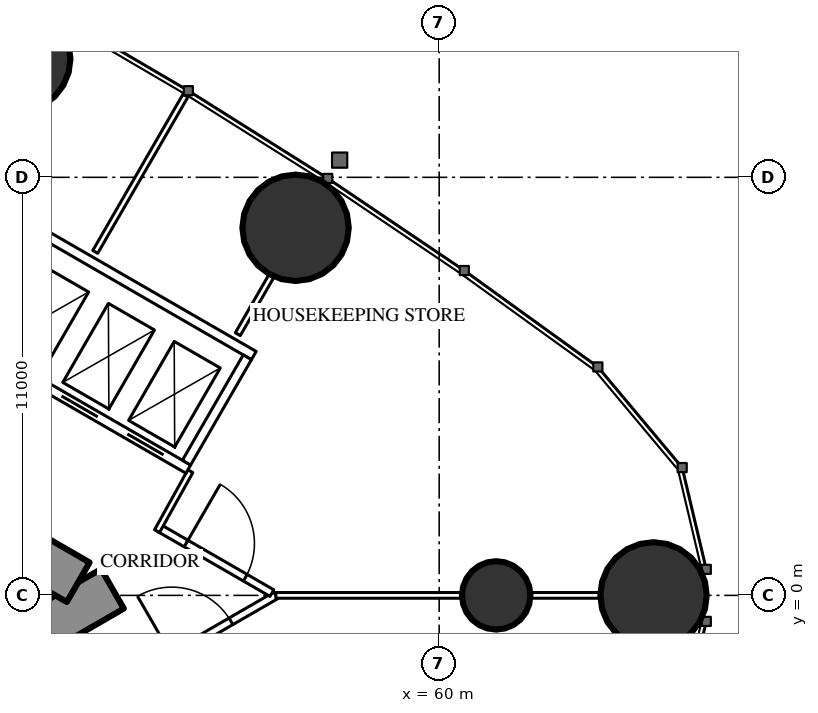
"""IFC4 building model, lengths in metres.
Left out: names, types, materials, properties, quantities, classifications, styles, units other than length and angle.
Written with IfcOpenShell. Run it as: python <this file> out.ifc"""

import sys

from ifc_helpers import new_model, si_unit, direction, frame, frame_2d, origin, origin_2d, place, context, subcontext, project, spatial, rectangle, circle, extrude, element, fill, save


model = new_model("IFC4")
c1 = context("Model", 3, precision=1e-05, world=origin(), true_north=direction((0.0, 1.0)))
c2 = subcontext(c1, "Body", "Model", "MODEL_VIEW")
j1 = project(units=[si_unit("LENGTHUNIT", "METRE"), si_unit("PLANEANGLEUNIT", "RADIAN")], contexts=[c1])
p1 = place(None, origin())
s1 = spatial("IfcSite", under=j1, at=p1, CompositionType="ELEMENT")
p2 = place(p1, origin())
s2 = spatial("IfcBuilding", under=s1, at=p2, CompositionType="ELEMENT")
p3 = place(p2, frame((0.0, 0.0, 191.3)))
s3 = spatial("IfcBuildingStorey", under=s2, at=p3, CompositionType="ELEMENT", Elevation=191.3)
for number, where, z_axis, x_axis in (
    (1, (65.64, 0.0, 0.0), (0.0, 0.0, 1.0), (1.0, 0.0, 0.0)),
    (2, (56.221, 9.672, 0.0), (0.0, 0.0, 1.0), (1.0, 0.0, 0.0)),
    (3, (48.897, 14.121, 0.0), (0.0, 0.0, 1.0), (1.0, 0.0, 0.0)),
):
    element("IfcColumn", number, at=place(p3, frame(where, z_axis=z_axis, x_axis=x_axis)), inside=s3, PredefinedType="COLUMN", context=c2, shape_type="SweptSolid", body=[
        extrude(circle(Radius=1.4, at=origin_2d()), origin(), (0.0, 0.0, 1.0), 3.5),
    ])
p4 = place(p3, frame((61.5, 0.0, 0.0), z_axis=(0.0, 0.0, 1.0), x_axis=(1.0, 0.0, 0.0)))
e4 = element("IfcColumn", 4, at=p4, inside=s3, PredefinedType="COLUMN", context=c2, shape_type="SweptSolid", body=[
    extrude(circle(Radius=0.9, at=origin_2d()), origin(), (0.0, 0.0, 1.0), 3.5),
])
p5 = place(p3, frame((27.2, -13.8, 0.0), z_axis=(0.0, 0.0, 1.0), x_axis=(0.866027159892, 0.499996958321, 0.0)))
e5 = element("IfcWall", 5, at=p5, inside=s3, PredefinedType="SHEAR", context=c2, shape_type="SweptSolid", body=[
    extrude(rectangle(XDim=27.947, YDim=1.2, at=frame_2d((13.973, 0.0))), origin(), (0.0, 0.0, 1.0), 3.5),
])
p6 = place(p5, frame((4.6, 0.0, 0.0)))
e6 = element("IfcOpeningElement", 6, at=p6, cuts=e5, PredefinedType="OPENING", context=c2, shape_type="SweptSolid", body=[
    extrude(rectangle(XDim=1.0, YDim=2.2, at=frame_2d((0.5, 1.1))), frame((0.0, 0.61, 0.0), z_axis=(0.0, -1.0, 0.0), x_axis=(1.0, 0.0, 0.0)), (0.0, 0.0, 1.0), 1.22),
])
p7 = place(p5, frame((13.395, 0.0, 0.0)))
e7 = element("IfcOpeningElement", 7, at=p7, cuts=e5, PredefinedType="OPENING", context=c2, shape_type="SweptSolid", body=[
    extrude(rectangle(XDim=1.8, YDim=2.2, at=frame_2d((0.9, 1.1))), frame((0.0, 0.61, 0.0), z_axis=(0.0, -1.0, 0.0), x_axis=(1.0, 0.0, 0.0)), (0.0, 0.0, 1.0), 1.22),
])
p8 = place(p3, frame((27.2, 13.8, 0.0), z_axis=(0.0, 0.0, 1.0), x_axis=(0.866024515034, -0.500001539357, 0.0)))
e8 = element("IfcWall", 8, at=p8, inside=s3, PredefinedType="SHEAR", context=c2, shape_type="SweptSolid", body=[
    extrude(rectangle(XDim=26.907, YDim=1.2, at=frame_2d((13.454, 0.0))), origin(), (0.0, 0.0, 1.0), 3.5),
])
p9 = place(p8, frame((4.6, 0.0, 0.0)))
e9 = element("IfcOpeningElement", 9, at=p9, cuts=e8, PredefinedType="OPENING", context=c2, shape_type="SweptSolid", body=[
    extrude(rectangle(XDim=1.0, YDim=2.2, at=frame_2d((0.5, 1.1))), frame((0.0, 0.61, 0.0), z_axis=(0.0, -1.0, 0.0), x_axis=(1.0, 0.0, 0.0)), (0.0, 0.0, 1.0), 1.22),
])
p10 = place(p8, frame((13.395, 0.0, 0.0)))
e10 = element("IfcOpeningElement", 10, at=p10, cuts=e8, PredefinedType="OPENING", context=c2, shape_type="SweptSolid", body=[
    extrude(rectangle(XDim=1.8, YDim=2.2, at=frame_2d((0.9, 1.1))), frame((0.0, 0.61, 0.0), z_axis=(0.0, -1.0, 0.0), x_axis=(1.0, 0.0, 0.0)), (0.0, 0.0, 1.0), 1.22),
])
p11 = place(p3, frame((27.959, -16.017, 0.0), z_axis=(0.0, 0.0, 1.0), x_axis=(0.866024151371, 0.500002169237, 0.0)))
e11 = element("IfcWall", 11, at=p11, inside=s3, PredefinedType="PARTITIONING", context=c2, shape_type="SweptSolid", body=[
    extrude(rectangle(XDim=32.034, YDim=0.2, at=frame_2d((16.017, 0.0))), origin(), (0.0, 0.0, 1.0), 3.25),
])
p12 = place(p11, frame((0.6, 0.0, 0.0)))
e12 = element("IfcOpeningElement", 12, at=p12, cuts=e11, PredefinedType="OPENING", context=c2, shape_type="SweptSolid", body=[
    extrude(rectangle(XDim=0.95, YDim=2.2, at=frame_2d((0.475, 1.1))), frame((0.0, 0.11, 0.0), z_axis=(0.0, -1.0, 0.0), x_axis=(1.0, 0.0, 0.0)), (0.0, 0.0, 1.0), 0.22),
])
p13 = place(p11, frame((13.132, 0.0, 0.0)))
e13 = element("IfcOpeningElement", 13, at=p13, cuts=e11, PredefinedType="OPENING", context=c2, shape_type="SweptSolid", body=[
    extrude(rectangle(XDim=0.95, YDim=2.2, at=frame_2d((0.475, 1.1))), frame((0.0, 0.11, 0.0), z_axis=(0.0, -1.0, 0.0), x_axis=(1.0, 0.0, 0.0)), (0.0, 0.0, 1.0), 0.22),
])
p14 = place(p11, frame((15.391, 0.0, 0.0)))
e14 = element("IfcOpeningElement", 14, at=p14, cuts=e11, PredefinedType="OPENING", context=c2, shape_type="SweptSolid", body=[
    extrude(rectangle(XDim=0.95, YDim=2.2, at=frame_2d((0.475, 1.1))), frame((0.0, 0.11, 0.0), z_axis=(0.0, -1.0, 0.0), x_axis=(1.0, 0.0, 0.0)), (0.0, 0.0, 1.0), 0.22),
])
p15 = place(p11, frame((19.441, 0.0, 0.0)))
e15 = element("IfcOpeningElement", 15, at=p15, cuts=e11, PredefinedType="OPENING", context=c2, shape_type="SweptSolid", body=[
    extrude(rectangle(XDim=0.95, YDim=2.2, at=frame_2d((0.475, 1.1))), frame((0.0, 0.11, 0.0), z_axis=(0.0, -1.0, 0.0), x_axis=(1.0, 0.0, 0.0)), (0.0, 0.0, 1.0), 0.22),
])
p16 = place(p11, frame((26.406, 0.0, 0.0)))
e16 = element("IfcOpeningElement", 16, at=p16, cuts=e11, PredefinedType="OPENING", context=c2, shape_type="SweptSolid", body=[
    extrude(rectangle(XDim=0.95, YDim=2.2, at=frame_2d((0.475, 1.1))), frame((0.0, 0.11, 0.0), z_axis=(0.0, -1.0, 0.0), x_axis=(1.0, 0.0, 0.0)), (0.0, 0.0, 1.0), 0.22),
])
p17 = place(p11, frame((28.87, 0.0, 0.0)))
e17 = element("IfcOpeningElement", 17, at=p17, cuts=e11, PredefinedType="OPENING", context=c2, shape_type="SweptSolid", body=[
    extrude(rectangle(XDim=1.8, YDim=2.2, at=frame_2d((0.9, 1.1))), frame((0.0, 0.11, 0.0), z_axis=(0.0, -1.0, 0.0), x_axis=(1.0, 0.0, 0.0)), (0.0, 0.0, 1.0), 0.22),
])
p18 = place(p3, frame((55.702, 0.0, 0.0), z_axis=(0.0, 0.0, 1.0), x_axis=(1.0, 0.0, 0.0)))
e18 = element("IfcWall", 18, at=p18, inside=s3, PredefinedType="PARTITIONING", context=c2, shape_type="SweptSolid", body=[
    extrude(rectangle(XDim=8.518, YDim=0.15, at=frame_2d((4.259, 0.0))), origin(), (0.0, 0.0, 1.0), 2.3),
])
p19 = place(p3, frame((50.95, 9.037, 0.0), z_axis=(0.0, 0.0, 1.0), x_axis=(0.499988022762, 0.866032318735, 0.0)))
e19 = element("IfcWall", 19, at=p19, inside=s3, PredefinedType="PARTITIONING", context=c2, shape_type="SweptSolid", body=[
    extrude(rectangle(XDim=4.748, YDim=0.15, at=frame_2d((2.374, 0.0))), origin(), (0.0, 0.0, 1.0), 3.25),
])
p20 = place(p3, frame((54.7, 6.872, 0.0), z_axis=(0.0, 0.0, 1.0), x_axis=(0.499989690894, 0.866031355668, 0.0)))
e20 = element("IfcWall", 20, at=p20, inside=s3, PredefinedType="PARTITIONING", context=c2, shape_type="SweptSolid", body=[
    extrude(rectangle(XDim=1.766, YDim=0.15, at=frame_2d((0.883, 0.0))), origin(), (0.0, 0.0, 1.0), 3.25),
])
p21 = place(p3, frame((52.639, 1.769, 0.0), z_axis=(0.0, 0.0, 1.0), x_axis=(0.866027340901, -0.4999966448, 0.0)))
e21 = element("IfcWall", 21, at=p21, inside=s3, PredefinedType="PARTITIONING", context=c2, shape_type="SweptSolid", body=[
    extrude(rectangle(XDim=3.417, YDim=0.2, at=frame_2d((1.708, 0.0))), origin(), (0.0, 0.0, 1.0), 3.25),
])
p22 = place(p21, frame((0.809, 0.0, 0.0)))
e22 = element("IfcOpeningElement", 22, at=p22, cuts=e21, PredefinedType="OPENING", context=c2, shape_type="SweptSolid", body=[
    extrude(rectangle(XDim=1.8, YDim=2.2, at=frame_2d((0.9, 1.1))), frame((0.0, 0.11, 0.0), z_axis=(0.0, -1.0, 0.0), x_axis=(1.0, 0.0, 0.0)), (0.0, 0.0, 1.0), 0.22),
])
p23 = place(p3, frame((52.576, 1.689, 0.0), z_axis=(0.0, 0.0, 1.0), x_axis=(0.485482130951, 0.874246590229, 0.0)))
e23 = element("IfcWall", 23, at=p23, inside=s3, PredefinedType="PARTITIONING", context=c2, shape_type="SweptSolid", body=[
    extrude(rectangle(XDim=1.805, YDim=0.15, at=frame_2d((0.902, 0.0))), origin(), (0.0, 0.0, 1.0), 3.25),
])
p24 = place(p3, frame((47.681, 6.622, 0.0), z_axis=(0.0, 0.0, 1.0), x_axis=(0.86603344179, -0.499986077507, 0.0)))
e24 = element("IfcWall", 24, at=p24, inside=s3, PredefinedType="PARTITIONING", context=c2, shape_type="SweptSolid", body=[
    extrude(rectangle(XDim=6.6, YDim=0.25, at=frame_2d((3.3, 0.0))), origin(), (0.0, 0.0, 1.0), 3.25),
])
p25 = place(p24, frame((0.75, 0.0, 0.0)))
e25 = element("IfcOpeningElement", 25, at=p25, cuts=e24, PredefinedType="OPENING", context=c2, shape_type="SweptSolid", body=[
    extrude(rectangle(XDim=1.1, YDim=2.2, at=frame_2d((0.55, 1.1))), frame((0.0, 0.135, 0.0), z_axis=(0.0, -1.0, 0.0), x_axis=(1.0, 0.0, 0.0)), (0.0, 0.0, 1.0), 0.27),
])
p26 = place(p24, frame((2.75, 0.0, 0.0)))
e26 = element("IfcOpeningElement", 26, at=p26, cuts=e24, PredefinedType="OPENING", context=c2, shape_type="SweptSolid", body=[
    extrude(rectangle(XDim=1.1, YDim=2.2, at=frame_2d((0.55, 1.1))), frame((0.0, 0.135, 0.0), z_axis=(0.0, -1.0, 0.0), x_axis=(1.0, 0.0, 0.0)), (0.0, 0.0, 1.0), 0.27),
])
p27 = place(p24, frame((4.75, 0.0, 0.0)))
e27 = element("IfcOpeningElement", 27, at=p27, cuts=e24, PredefinedType="OPENING", context=c2, shape_type="SweptSolid", body=[
    extrude(rectangle(XDim=1.1, YDim=2.2, at=frame_2d((0.55, 1.1))), frame((0.0, 0.135, 0.0), z_axis=(0.0, -1.0, 0.0), x_axis=(1.0, 0.0, 0.0)), (0.0, 0.0, 1.0), 0.27),
])
p28 = place(p3, frame((49.406, 9.611, 0.0), z_axis=(0.0, 0.0, 1.0), x_axis=(0.86603344179, -0.499986077507, 0.0)))
e28 = element("IfcWall", 28, at=p28, inside=s3, PredefinedType="PARTITIONING", context=c2, shape_type="SweptSolid", body=[
    extrude(rectangle(XDim=6.6, YDim=0.25, at=frame_2d((3.3, 0.0))), origin(), (0.0, 0.0, 1.0), 3.25),
])
p29 = place(p3, frame((53.352, 3.493, 0.0), z_axis=(0.0, 0.0, 1.0), x_axis=(0.499872130319, 0.866099216793, 0.0)))
e29 = element("IfcWall", 29, at=p29, inside=s3, PredefinedType="PARTITIONING", context=c2, shape_type="SweptSolid", body=[
    extrude(rectangle(XDim=3.2, YDim=0.25, at=frame_2d((1.6, 0.0))), origin(), (0.0, 0.0, 1.0), 3.25),
])
p30 = place(p17, origin())
e30 = element("IfcDoor", 30, at=p30, inside=s3, OperationType="DOUBLE_DOOR_SINGLE_SWING", PredefinedType="DOOR", context=c2, shape_type="SweptSolid", body=[
    extrude(rectangle(XDim=1.8, YDim=2.2, at=frame_2d((0.9, 1.1))), frame((0.0, 0.025, 0.0), z_axis=(0.0, -1.0, 0.0), x_axis=(1.0, 0.0, 0.0)), (0.0, 0.0, 1.0), 0.05),
])
fill(e17, e30)
p31 = place(p22, origin())
e31 = element("IfcDoor", 31, at=p31, inside=s3, OperationType="DOUBLE_DOOR_SINGLE_SWING", PredefinedType="DOOR", context=c2, shape_type="SweptSolid", body=[
    extrude(rectangle(XDim=1.8, YDim=2.2, at=frame_2d((0.9, 1.1))), frame((0.0, 0.025, 0.0), z_axis=(0.0, -1.0, 0.0), x_axis=(1.0, 0.0, 0.0)), (0.0, 0.0, 1.0), 0.05),
])
fill(e22, e31)
p32 = place(p26, origin())
e32 = element("IfcDoor", 32, at=p32, inside=s3, OperationType="DOUBLE_DOOR_SLIDING", PredefinedType="USERDEFINED", context=c2, shape_type="SweptSolid", body=[
    extrude(rectangle(XDim=1.1, YDim=2.2, at=frame_2d((0.55, 1.1))), frame((0.0, 0.025, 0.0), z_axis=(0.0, -1.0, 0.0), x_axis=(1.0, 0.0, 0.0)), (0.0, 0.0, 1.0), 0.05),
])
fill(e26, e32)
p33 = place(p27, origin())
e33 = element("IfcDoor", 33, at=p33, inside=s3, OperationType="DOUBLE_DOOR_SLIDING", PredefinedType="USERDEFINED", context=c2, shape_type="SweptSolid", body=[
    extrude(rectangle(XDim=1.1, YDim=2.2, at=frame_2d((0.55, 1.1))), frame((0.0, 0.025, 0.0), z_axis=(0.0, -1.0, 0.0), x_axis=(1.0, 0.0, 0.0)), (0.0, 0.0, 1.0), 0.05),
])
fill(e27, e33)
save(model, sys.argv[1])
